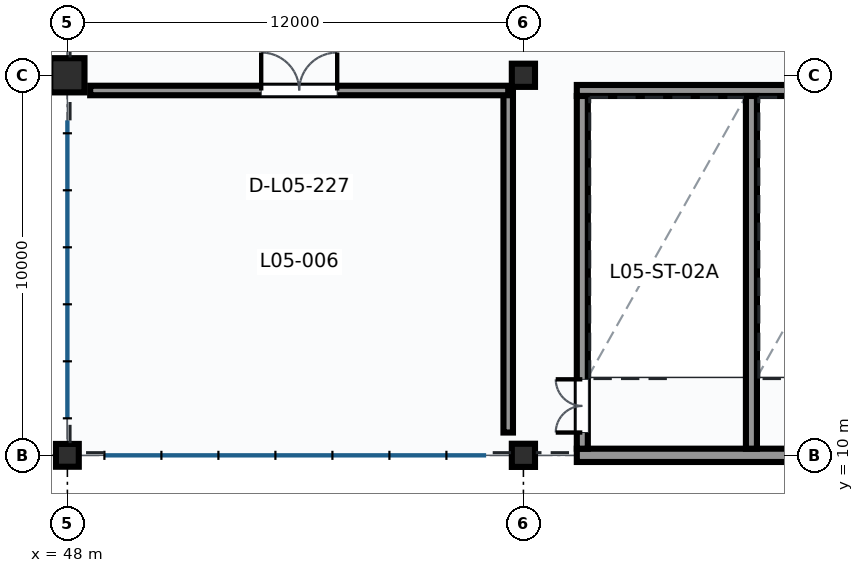
"""IFC4 building model, lengths in metres.
Left out: names, types, materials, properties, quantities, classifications, styles, units other than length and angle.
Written with IfcOpenShell. Run it as: python <this file> out.ifc"""

import sys

from ifc_helpers import new_model, si_unit, direction, frame, frame_2d, origin, origin_2d, place, context, subcontext, project, spatial, rectangle, circle, hollow_circle, extrude, element, fill, save


model = new_model("IFC4")
c1 = context("Model", 3, precision=1e-05, world=origin(), true_north=direction((0.0, 1.0)))
c2 = subcontext(c1, "Body", "Model", "MODEL_VIEW")
j1 = project(units=[si_unit("LENGTHUNIT", "METRE"), si_unit("PLANEANGLEUNIT", "RADIAN")], contexts=[c1])
p1 = place(None, origin())
s1 = spatial("IfcSite", under=j1, at=p1, CompositionType="ELEMENT")
p2 = place(p1, origin())
s2 = spatial("IfcBuilding", under=s1, at=p2, CompositionType="ELEMENT")
p3 = place(p2, frame((0.0, 0.0, 24.6)))
s3 = spatial("IfcBuildingStorey", under=s2, at=p3, CompositionType="ELEMENT", Elevation=24.6)
p4 = place(p3, frame((48.0, 10.0, 0.0), z_axis=(0.0, 0.0, 1.0), x_axis=(1.0, 0.0, 0.0)))
e1 = element("IfcColumn", 1, at=p4, inside=s3, PredefinedType="COLUMN", context=c2, shape_type="SweptSolid", body=[
    extrude(rectangle(XDim=0.6, YDim=0.6, at=origin_2d()), origin(), (0.0, 0.0, 1.0), 4.8),
])
p5 = place(p3, frame((48.0, 20.0, 0.0), z_axis=(0.0, 0.0, 1.0), x_axis=(1.0, 0.0, 0.0)))
e2 = element("IfcColumn", 2, at=p5, inside=s3, PredefinedType="COLUMN", context=c2, shape_type="SweptSolid", body=[
    extrude(circle(Radius=0.45, at=origin_2d()), origin(), (0.0, 0.0, 1.0), 4.8),
])
for number, where, z_axis, x_axis in (
    (3, (60.0, 10.0, 0.0), (0.0, 0.0, 1.0), (1.0, 0.0, 0.0)),
    (4, (60.0, 20.0, 0.0), (0.0, 0.0, 1.0), (1.0, 0.0, 0.0)),
):
    element("IfcColumn", number, at=place(p3, frame(where, z_axis=z_axis, x_axis=x_axis)), inside=s3, PredefinedType="COLUMN", context=c2, shape_type="SweptSolid", body=[
        extrude(hollow_circle(Radius=0.305, WallThickness=0.025, at=origin_2d()), origin(), (0.0, 0.0, 1.0), 4.8),
    ])
p6 = place(p3, frame((61.405, 10.0, 0.0), z_axis=(0.0, 0.0, 1.0), x_axis=(1.0, 0.0, 0.0)))
e5 = element("IfcWall", 5, at=p6, inside=s3, PredefinedType="SHEAR", context=c2, shape_type="SweptSolid", body=[
    extrude(rectangle(XDim=9.19, YDim=0.35, at=frame_2d((4.595, 0.0))), origin(), (0.0, 0.0, 1.0), 4.236),
])
p7 = place(p3, frame((61.405, 19.6, 0.0), z_axis=(0.0, 0.0, 1.0), x_axis=(1.0, 0.0, 0.0)))
e6 = element("IfcWall", 6, at=p7, inside=s3, PredefinedType="SHEAR", context=c2, shape_type="SweptSolid", body=[
    extrude(rectangle(XDim=9.19, YDim=0.29, at=frame_2d((4.595, 0.0))), origin(), (0.0, 0.0, 1.0), 4.46),
])
p8 = place(p3, frame((61.55, 10.175, 0.0), z_axis=(0.0, 0.0, 1.0), x_axis=(0.0, 1.0, 0.0)))
e7 = element("IfcWall", 7, at=p8, inside=s3, PredefinedType="SHEAR", context=c2, shape_type="SweptSolid", body=[
    extrude(rectangle(XDim=9.28, YDim=0.29, at=frame_2d((4.64, 0.0))), origin(), (0.0, 0.0, 1.0), 4.46),
])
p9 = place(p8, frame((0.425, 0.0, 0.0)))
e8 = element("IfcOpeningElement", 8, at=p9, cuts=e7, PredefinedType="OPENING", context=c2, shape_type="SweptSolid", body=[
    extrude(rectangle(XDim=1.4, YDim=2.2, at=frame_2d((0.7, 1.1))), frame((0.0, 0.155, 0.0), z_axis=(0.0, -1.0, 0.0), x_axis=(1.0, 0.0, 0.0)), (0.0, 0.0, 1.0), 0.31),
])
p10 = place(p3, frame((66.0, 10.175, 0.0), z_axis=(0.0, 0.0, 1.0), x_axis=(0.0, 1.0, 0.0)))
e9 = element("IfcWall", 9, at=p10, inside=s3, PredefinedType="SHEAR", context=c2, shape_type="SweptSolid", body=[
    extrude(rectangle(XDim=9.28, YDim=0.29, at=frame_2d((4.64, 0.0))), origin(), (0.0, 0.0, 1.0), 4.46),
])
p11 = place(p3, frame((59.6, 19.6, 0.0), z_axis=(0.0, 0.0, 1.0), x_axis=(0.0, -1.0, 0.0)))
e10 = element("IfcWall", 10, at=p11, inside=s3, PredefinedType="SOLIDWALL", context=c2, shape_type="SweptSolid", body=[
    extrude(rectangle(XDim=9.0, YDim=0.25, at=frame_2d((4.5, 0.0))), origin(), (0.0, 0.0, 1.0), 4.58),
])
p12 = place(p3, frame((48.6, 19.6, 0.0), z_axis=(0.0, 0.0, 1.0), x_axis=(1.0, 0.0, 0.0)))
e11 = element("IfcWall", 11, at=p12, inside=s3, PredefinedType="SOLIDWALL", context=c2, shape_type="SweptSolid", body=[
    extrude(rectangle(XDim=11.0, YDim=0.25, at=frame_2d((5.5, 0.0))), origin(), (0.0, 0.0, 1.0), 4.58),
])
p13 = place(p12, frame((4.5, 0.0, 0.0)))
e12 = element("IfcOpeningElement", 12, at=p13, cuts=e11, PredefinedType="OPENING", context=c2, shape_type="SweptSolid", body=[
    extrude(rectangle(XDim=2.0, YDim=2.4, at=frame_2d((1.0, 1.2))), frame((0.0, 0.135, 0.0), z_axis=(0.0, -1.0, 0.0), x_axis=(1.0, 0.0, 0.0)), (0.0, 0.0, 1.0), 0.27),
])
p14 = place(p9, frame((1.4, 0.0, 0.0), z_axis=(0.0, 0.0, 1.0), x_axis=(-1.0, 0.0, 0.0)))
e13 = element("IfcDoor", 13, at=p14, inside=s3, OperationType="DOUBLE_DOOR_SINGLE_SWING", PredefinedType="DOOR", context=c2, shape_type="SweptSolid", body=[
    extrude(rectangle(XDim=1.4, YDim=2.2, at=frame_2d((0.7, 1.1))), frame((0.0, 0.025, 0.0), z_axis=(0.0, -1.0, 0.0), x_axis=(1.0, 0.0, 0.0)), (0.0, 0.0, 1.0), 0.05),
])
fill(e8, e13)
p15 = place(p13, origin())
e14 = element("IfcDoor", 14, at=p15, inside=s3, OperationType="DOUBLE_DOOR_SINGLE_SWING", PredefinedType="DOOR", context=c2, shape_type="SweptSolid", body=[
    extrude(rectangle(XDim=2.0, YDim=2.4, at=frame_2d((1.0, 1.2))), frame((0.0, 0.025, 0.0), z_axis=(0.0, -1.0, 0.0), x_axis=(1.0, 0.0, 0.0)), (0.0, 0.0, 1.0), 0.05),
])
fill(e12, e14)
save(model, sys.argv[1])
